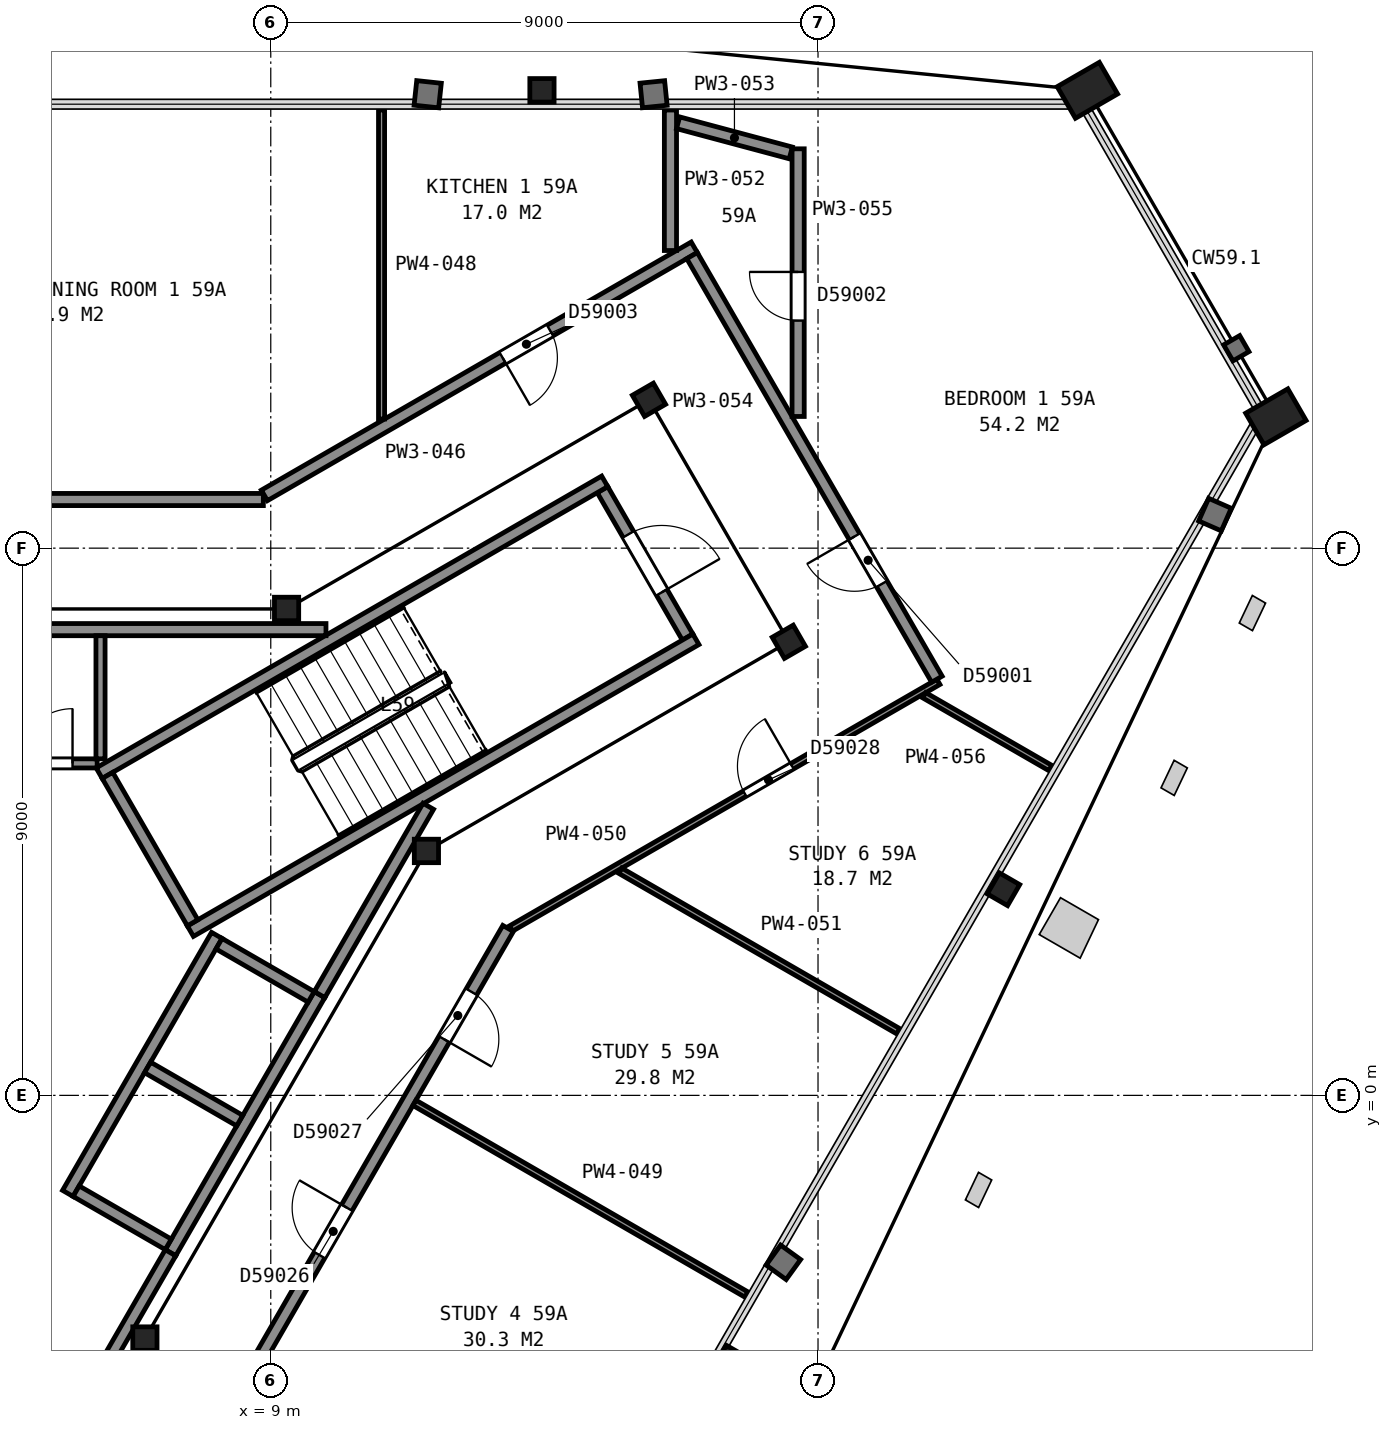
"""IFC4 building model, lengths in metres.
Left out: names, types, materials, properties, quantities, classifications, styles, units other than length and angle.
Written with IfcOpenShell. Run it as: python <this file> out.ifc"""

import sys

from ifc_helpers import new_model, si_unit, direction, frame, frame_2d, origin, origin_2d, place, context, subcontext, project, spatial, rectangle, hollow_rectangle, i_section, extrude, element, fill, save


model = new_model("IFC4")
c1 = context("Model", 3, precision=1e-05, world=origin(), true_north=direction((0.0, 1.0)))
c2 = subcontext(c1, "Body", "Model", "MODEL_VIEW")
j1 = project(units=[si_unit("LENGTHUNIT", "METRE"), si_unit("PLANEANGLEUNIT", "RADIAN")], contexts=[c1])
p1 = place(None, origin())
s1 = spatial("IfcSite", under=j1, at=p1, CompositionType="ELEMENT")
p2 = place(p1, origin())
s2 = spatial("IfcBuilding", under=s1, at=p2, CompositionType="ELEMENT")
p3 = place(p2, frame((0.0, 0.0, 236.0)))
s3 = spatial("IfcBuildingStorey", under=s2, at=p3, CompositionType="ELEMENT", Elevation=236.0)
p4 = place(p3, frame((22.43, 16.53, 0.065), z_axis=(0.0, 0.0, 1.0), x_axis=(0.5, -0.866025403784, 0.0)))
e1 = element("IfcColumn", 1, at=p4, inside=s3, PredefinedType="COLUMN", context=c2, shape_type="SweptSolid", body=[
    extrude(hollow_rectangle(XDim=0.6, YDim=0.8, WallThickness=0.05, at=origin_2d()), origin(), (0.0, 0.0, 1.0), 3.635),
])
for number, where, z_axis, x_axis in (
    (2, (13.46, 16.53, 0.035), (0.0, 0.0, 1.0), (1.0, 0.0, 0.0)),
    (3, (16.56, -4.38, 0.035), (0.0, 0.0, 1.0), (-0.5, -0.866, 0.0)),
):
    element("IfcColumn", number, at=place(p3, frame(where, z_axis=z_axis, x_axis=x_axis)), inside=s3, PredefinedType="COLUMN", context=c2, shape_type="SweptSolid", body=[
        extrude(i_section(OverallWidth=0.399, OverallDepth=0.386, WebThickness=0.021, FlangeThickness=0.033, FilletRadius=0.015, at=origin_2d()), origin(), (0.0, 0.0, 1.0), 3.665),
    ])
p5 = place(p3, frame((21.05, 3.39, 0.04), z_axis=(0.0, 0.0, 1.0), x_axis=(-0.5, -0.866025403784, 0.0)))
e4 = element("IfcColumn", 4, at=p5, inside=s3, PredefinedType="COLUMN", context=c2, shape_type="SweptSolid", body=[
    extrude(i_section(OverallWidth=0.399, OverallDepth=0.386, WebThickness=0.021, FlangeThickness=0.033, FilletRadius=0.015, at=origin_2d()), origin(), (0.0, 0.0, 1.0), 3.66),
])
p6 = place(p3, frame((25.53, 11.16, 0.065), z_axis=(0.0, 0.0, 1.0), x_axis=(0.5, -0.866025403784, 0.0)))
e5 = element("IfcColumn", 5, at=p6, inside=s3, PredefinedType="COLUMN", context=c2, shape_type="SweptSolid", body=[
    extrude(hollow_rectangle(XDim=0.6, YDim=0.8, WallThickness=0.05, at=origin_2d()), origin(), (0.0, 0.0, 1.0), 3.635),
])
p7 = place(p3, frame((11.56, 4.02, 0.0), z_axis=(0.0, 0.0, 1.0), x_axis=(1.0, 0.0, 0.0)))
e6 = element("IfcColumn", 6, at=p7, inside=s3, PredefinedType="COLUMN", context=c2, shape_type="SweptSolid", body=[
    extrude(i_section(OverallWidth=0.399, OverallDepth=0.386, WebThickness=0.021, FlangeThickness=0.033, FilletRadius=0.015, at=origin_2d()), origin(), (0.0, 0.0, 1.0), 3.7),
])
for number, where, z_axis, x_axis in (
    (7, (17.52, 7.46, 0.0), (0.0, 0.0, 1.0), (0.5, -0.866, 0.0)),
    (8, (15.22, 11.44, 0.0), (0.0, 0.0, 1.0), (0.5, -0.866, 0.0)),
):
    element("IfcColumn", number, at=place(p3, frame(where, z_axis=z_axis, x_axis=x_axis)), inside=s3, PredefinedType="COLUMN", context=c2, shape_type="SweptSolid", body=[
        extrude(i_section(OverallWidth=0.401, OverallDepth=0.399, WebThickness=0.025, FlangeThickness=0.04, FilletRadius=0.015, at=origin_2d()), origin(), (0.0, 0.0, 1.0), 3.7),
    ])
for number, where, z_axis, x_axis in (
    (9, (9.26, 8.0, 0.0), (0.0, 0.0, 1.0), (1.0, 0.0, 0.0)),
    (10, (6.93, -4.0, 0.0), (0.0, 0.0, 1.0), (1.0, 0.0, 0.0)),
):
    element("IfcColumn", number, at=place(p3, frame(where, z_axis=z_axis, x_axis=x_axis)), inside=s3, PredefinedType="COLUMN", context=c2, shape_type="SweptSolid", body=[
        extrude(i_section(OverallWidth=0.399, OverallDepth=0.386, WebThickness=0.021, FlangeThickness=0.033, FilletRadius=0.015, at=origin_2d()), origin(), (0.0, 0.0, 1.0), 3.7),
    ])
p8 = place(p3, frame((15.855, 7.538, 0.0), z_axis=(0.0, 0.0, 1.0), x_axis=(-0.500049511043, 0.865996816683, 0.0)))
e11 = element("IfcWall", 11, at=p8, inside=s3, PredefinedType="PARTITIONING", context=c2, shape_type="SweptSolid", body=[
    extrude(rectangle(XDim=2.8, YDim=0.2, at=frame_2d((1.4, 0.0))), origin(), (0.0, 0.0, 1.0), 3.45),
])
p9 = place(p8, frame((0.85, 0.0, 0.0)))
e12 = element("IfcOpeningElement", 12, at=p9, cuts=e11, PredefinedType="OPENING", context=c2, shape_type="SweptSolid", body=[
    extrude(rectangle(XDim=1.1, YDim=2.1, at=frame_2d((0.55, 1.05))), frame((0.0, 0.11, 0.0), z_axis=(0.0, -1.0, 0.0), x_axis=(1.0, 0.0, 0.0)), (0.0, 0.0, 1.0), 0.22),
])
for number, where, z_axis, x_axis in (
    (13, (6.178, 5.299, 0.0), (0.0, 0.0, 1.0), (0.866, 0.5, 0.0)),
    (14, (7.678, 2.701, 0.0), (0.0, 0.0, 1.0), (0.866, 0.5, 0.0)),
):
    element("IfcWall", number, at=place(p3, frame(where, z_axis=z_axis, x_axis=x_axis)), inside=s3, PredefinedType="PARTITIONING", context=c2, shape_type="SweptSolid", body=[
        extrude(rectangle(XDim=9.6, YDim=0.2, at=frame_2d((4.8, 0.0))), origin(), (0.0, 0.0, 1.0), 3.45),
    ])
p10 = place(p3, frame((7.715, 2.838, 0.0), z_axis=(0.0, 0.0, 1.0), x_axis=(-0.500049511043, 0.865996816683, 0.0)))
e15 = element("IfcWall", 15, at=p10, inside=s3, PredefinedType="PARTITIONING", context=c2, shape_type="SweptSolid", body=[
    extrude(rectangle(XDim=2.8, YDim=0.2, at=frame_2d((1.4, 0.0))), origin(), (0.0, 0.0, 1.0), 3.45),
])
p11 = place(p3, frame((7.351, -2.587, 0.0), z_axis=(0.0, 0.0, 1.0), x_axis=(0.500002801628, 0.866023786258, 0.0)))
e16 = element("IfcWall", 16, at=p11, inside=s3, PredefinedType="PARTITIONING", context=c2, shape_type="SweptSolid", body=[
    extrude(rectangle(XDim=4.9, YDim=0.2, at=frame_2d((2.45, 0.0))), origin(), (0.0, 0.0, 1.0), 3.7),
])
p12 = place(p3, frame((5.663, -1.612, 0.0), z_axis=(0.0, 0.0, 1.0), x_axis=(0.49998122708, 0.866036242063, 0.0)))
e17 = element("IfcWall", 17, at=p12, inside=s3, PredefinedType="PARTITIONING", context=c2, shape_type="SweptSolid", body=[
    extrude(rectangle(XDim=4.9, YDim=0.2, at=frame_2d((2.45, 0.0))), origin(), (0.0, 0.0, 1.0), 3.7),
])
p13 = place(p3, frame((9.665, 1.62, 0.0), z_axis=(0.0, 0.0, 1.0), x_axis=(-0.866002029911, 0.500040482552, 0.0)))
e18 = element("IfcWall", 18, at=p13, inside=s3, PredefinedType="PARTITIONING", context=c2, shape_type="SweptSolid", body=[
    extrude(rectangle(XDim=1.75, YDim=0.2, at=frame_2d((0.875, 0.0))), origin(), (0.0, 0.0, 1.0), 3.7),
])
for number, where, z_axis, x_axis in (
    (19, (8.49, -0.416, 0.0), (0.0, 0.0, 1.0), (-0.866, 0.5, 0.0)),
    (20, (7.315, -2.451, 0.0), (0.0, 0.0, 1.0), (-0.866, 0.5, 0.0)),
):
    element("IfcWall", number, at=place(p3, frame(where, z_axis=z_axis, x_axis=x_axis)), inside=s3, PredefinedType="PARTITIONING", context=c2, shape_type="SweptSolid", body=[
        extrude(rectangle(XDim=1.75, YDim=0.2, at=frame_2d((0.875, 0.0))), origin(), (0.0, 0.0, 1.0), 3.7),
    ])
p14 = place(p3, frame((5.905, -4.893, 0.0), z_axis=(0.0, 0.0, 1.0), x_axis=(-0.866002029911, 0.500040482552, 0.0)))
e21 = element("IfcWall", 21, at=p14, inside=s3, PredefinedType="PARTITIONING", context=c2, shape_type="SweptSolid", body=[
    extrude(rectangle(XDim=1.75, YDim=0.2, at=frame_2d((0.875, 0.0))), origin(), (0.0, 0.0, 1.0), 3.7),
])
p15 = place(p3, frame((-3.933, 7.66, 0.0), z_axis=(0.0, 0.0, 1.0), x_axis=(1.0, 0.0, 0.0)))
e22 = element("IfcWall", 22, at=p15, inside=s3, PredefinedType="PARTITIONING", context=c2, shape_type="SweptSolid", body=[
    extrude(rectangle(XDim=13.841, YDim=0.2, at=frame_2d((6.92, 0.0))), origin(), (0.0, 0.0, 1.0), 3.45),
])
p16 = place(p3, frame((0.925, 5.46, 0.0), z_axis=(0.0, 0.0, 1.0), x_axis=(1.0, 0.0, 0.0)))
e23 = element("IfcWall", 23, at=p16, inside=s3, PredefinedType="PARTITIONING", context=c2, shape_type="SweptSolid", body=[
    extrude(rectangle(XDim=5.22, YDim=0.15, at=frame_2d((2.61, 0.0))), origin(), (0.0, 0.0, 1.0), 3.45),
])
p17 = place(p16, frame((3.915, 0.0, 0.0)))
e24 = element("IfcOpeningElement", 24, at=p17, cuts=e23, PredefinedType="OPENING", context=c2, shape_type="SweptSolid", body=[
    extrude(rectangle(XDim=0.9, YDim=2.1, at=frame_2d((0.45, 1.05))), frame((0.0, 0.085, 0.0), z_axis=(0.0, -1.0, 0.0), x_axis=(1.0, 0.0, 0.0)), (0.0, 0.0, 1.0), 0.17),
])
p18 = place(p3, frame((6.042, -4.855, 0.0), z_axis=(0.0, 0.0, 1.0), x_axis=(0.500252727967, 0.865879442048, 0.0)))
e25 = element("IfcWall", 25, at=p18, inside=s3, PredefinedType="PARTITIONING", context=c2, shape_type="SweptSolid", body=[
    extrude(rectangle(XDim=2.617, YDim=0.2, at=frame_2d((1.309, 0.0))), origin(), (0.0, 0.0, 1.0), 3.45),
])
p19 = place(p3, frame((6.2, 5.535, 0.0), z_axis=(0.0, 0.0, 1.0), x_axis=(0.0, 1.0, 0.0)))
e26 = element("IfcWall", 26, at=p19, inside=s3, PredefinedType="PARTITIONING", context=c2, shape_type="SweptSolid", body=[
    extrude(rectangle(XDim=2.025, YDim=0.15, at=frame_2d((1.013, 0.0))), origin(), (0.0, 0.0, 1.0), 3.45),
])
p20 = place(p3, frame((9.803, 1.658, 0.0), z_axis=(0.0, 0.0, 1.0), x_axis=(0.499943114462, 0.866058244174, 0.0)))
e27 = element("IfcWall", 27, at=p20, inside=s3, PredefinedType="PARTITIONING", context=c2, shape_type="SweptSolid", body=[
    extrude(rectangle(XDim=3.576, YDim=0.2, at=frame_2d((1.788, 0.0))), origin(), (0.0, 0.0, 1.0), 3.45),
])
p21 = place(p3, frame((-8.878, 9.8, 0.0), z_axis=(0.0, 0.0, 1.0), x_axis=(1.0, 0.0, 0.0)))
e28 = element("IfcWall", 28, at=p21, inside=s3, PredefinedType="PARTITIONING", context=c2, shape_type="SweptSolid", body=[
    extrude(rectangle(XDim=17.756, YDim=0.2, at=frame_2d((8.878, 0.0))), origin(), (0.0, 0.0, 1.0), 2.713),
])
p22 = place(p21, frame((12.792, 0.0, 0.0)))
e29 = element("IfcOpeningElement", 29, at=p22, cuts=e28, PredefinedType="OPENING", context=c2, shape_type="SweptSolid", body=[
    extrude(rectangle(XDim=1.2, YDim=2.1, at=frame_2d((0.6, 1.05))), frame((0.0, 0.11, 0.0), z_axis=(0.0, -1.0, 0.0), x_axis=(1.0, 0.0, 0.0)), (0.0, 0.0, 1.0), 0.22),
])
p23 = place(p21, frame((5.013, 0.0, 0.0)))
e30 = element("IfcOpeningElement", 30, at=p23, cuts=e28, PredefinedType="OPENING", context=c2, shape_type="SweptSolid", body=[
    extrude(rectangle(XDim=0.9, YDim=2.1, at=frame_2d((0.45, 1.05))), frame((0.0, 0.11, 0.0), z_axis=(0.0, -1.0, 0.0), x_axis=(1.0, 0.0, 0.0)), (0.0, 0.0, 1.0), 0.22),
])
p24 = place(p21, frame((1.834, 0.0, 0.0)))
e31 = element("IfcOpeningElement", 31, at=p24, cuts=e28, PredefinedType="OPENING", context=c2, shape_type="SweptSolid", body=[
    extrude(rectangle(XDim=0.9, YDim=2.1, at=frame_2d((0.45, 1.05))), frame((0.0, 0.11, 0.0), z_axis=(0.0, -1.0, 0.0), x_axis=(1.0, 0.0, 0.0)), (0.0, 0.0, 1.0), 0.22),
])
p25 = place(p3, frame((12.903, 2.745, 0.0), z_axis=(0.0, 0.0, 1.0), x_axis=(-0.499997769292, -0.86602669168, 0.0)))
e32 = element("IfcWall", 32, at=p25, inside=s3, PredefinedType="PARTITIONING", context=c2, shape_type="SweptSolid", body=[
    extrude(rectangle(XDim=17.706, YDim=0.2, at=frame_2d((8.853, 0.0))), origin(), (0.0, 0.0, 1.0), 2.713),
])
p26 = place(p25, frame((14.637, 0.0, 0.0)))
e33 = element("IfcOpeningElement", 33, at=p26, cuts=e32, PredefinedType="OPENING", context=c2, shape_type="SweptSolid", body=[
    extrude(rectangle(XDim=0.9, YDim=2.1, at=frame_2d((0.45, 1.05))), frame((0.0, 0.11, 0.0), z_axis=(0.0, -1.0, 0.0), x_axis=(1.0, 0.0, 0.0)), (0.0, 0.0, 1.0), 0.22),
])
p27 = place(p25, frame((11.858, 0.0, 0.0)))
e34 = element("IfcOpeningElement", 34, at=p27, cuts=e32, PredefinedType="OPENING", context=c2, shape_type="SweptSolid", body=[
    extrude(rectangle(XDim=0.9, YDim=2.1, at=frame_2d((0.45, 1.05))), frame((0.0, 0.11, 0.0), z_axis=(0.0, -1.0, 0.0), x_axis=(1.0, 0.0, 0.0)), (0.0, 0.0, 1.0), 0.22),
])
p28 = place(p25, frame((5.303, 0.0, 0.0)))
e35 = element("IfcOpeningElement", 35, at=p28, cuts=e32, PredefinedType="OPENING", context=c2, shape_type="SweptSolid", body=[
    extrude(rectangle(XDim=0.9, YDim=2.1, at=frame_2d((0.45, 1.05))), frame((0.0, 0.11, 0.0), z_axis=(0.0, -1.0, 0.0), x_axis=(1.0, 0.0, 0.0)), (0.0, 0.0, 1.0), 0.22),
])
p29 = place(p25, frame((1.204, 0.0, 0.0)))
e36 = element("IfcOpeningElement", 36, at=p29, cuts=e32, PredefinedType="OPENING", context=c2, shape_type="SweptSolid", body=[
    extrude(rectangle(XDim=0.9, YDim=2.1, at=frame_2d((0.45, 1.05))), frame((0.0, 0.11, 0.0), z_axis=(0.0, -1.0, 0.0), x_axis=(1.0, 0.0, 0.0)), (0.0, 0.0, 1.0), 0.22),
])
p30 = place(p3, frame((8.895, 9.867, 0.0), z_axis=(0.0, 0.0, 1.0), x_axis=(0.866081499088, 0.499902827495, 0.0)))
e37 = element("IfcWall", 37, at=p30, inside=s3, PredefinedType="PARTITIONING", context=c2, shape_type="SweptSolid", body=[
    extrude(rectangle(XDim=8.163, YDim=0.2, at=frame_2d((4.081, 0.0))), origin(), (0.0, 0.0, 1.0), 2.713),
])
p31 = place(p30, frame((4.525, 0.0, 0.0)))
e38 = element("IfcOpeningElement", 38, at=p31, cuts=e37, PredefinedType="OPENING", context=c2, shape_type="SweptSolid", body=[
    extrude(rectangle(XDim=0.9, YDim=2.1, at=frame_2d((0.45, 1.05))), frame((0.0, 0.11, 0.0), z_axis=(0.0, -1.0, 0.0), x_axis=(1.0, 0.0, 0.0)), (0.0, 0.0, 1.0), 0.22),
])
p32 = place(p3, frame((10.822, 11.124, 0.0), z_axis=(0.0, 0.0, 1.0), x_axis=(0.0, 1.0, 0.0)))
e39 = element("IfcWall", 39, at=p32, inside=s3, PredefinedType="PARTITIONING", context=c2, shape_type="SweptSolid", body=[
    extrude(rectangle(XDim=5.082, YDim=0.1, at=frame_2d((2.541, 0.0))), origin(), (0.0, 0.0, 1.0), 2.713),
])
p33 = place(p3, frame((11.363, -0.123, 0.0), z_axis=(0.0, 0.0, 1.0), x_axis=(0.866027573341, -0.4999962422, 0.0)))
e40 = element("IfcWall", 40, at=p33, inside=s3, PredefinedType="PARTITIONING", context=c2, shape_type="SweptSolid", body=[
    extrude(rectangle(XDim=6.304, YDim=0.1, at=frame_2d((3.152, 0.0))), origin(), (0.0, 0.0, 1.0), 2.713),
])
p34 = place(p3, frame((19.98, 6.801, 0.0), z_axis=(0.0, 0.0, 1.0), x_axis=(-0.866087400697, -0.49989260282, 0.0)))
e41 = element("IfcWall", 41, at=p34, inside=s3, PredefinedType="PARTITIONING", context=c2, shape_type="SweptSolid", body=[
    extrude(rectangle(XDim=8.115, YDim=0.1, at=frame_2d((4.058, 0.0))), origin(), (0.0, 0.0, 1.0), 2.713),
])
p35 = place(p34, frame((2.777, 0.0, 0.0)))
e42 = element("IfcOpeningElement", 42, at=p35, cuts=e41, PredefinedType="OPENING", context=c2, shape_type="SweptSolid", body=[
    extrude(rectangle(XDim=0.9, YDim=2.1, at=frame_2d((0.45, 1.05))), frame((0.0, 0.06, 0.0), z_axis=(0.0, -1.0, 0.0), x_axis=(1.0, 0.0, 0.0)), (0.0, 0.0, 1.0), 0.12),
])
p36 = place(p3, frame((14.748, 3.695, 0.0), z_axis=(0.0, 0.0, 1.0), x_axis=(0.86599232748, -0.500057285464, 0.0)))
e43 = element("IfcWall", 43, at=p36, inside=s3, PredefinedType="PARTITIONING", context=c2, shape_type="SweptSolid", body=[
    extrude(rectangle(XDim=5.281, YDim=0.1, at=frame_2d((2.64, 0.0))), origin(), (0.0, 0.0, 1.0), 2.713),
])
p37 = place(p3, frame((15.573, 13.895, 0.0), z_axis=(0.0, 0.0, 1.0), x_axis=(0.0, 1.0, 0.0)))
e44 = element("IfcWall", 44, at=p37, inside=s3, PredefinedType="PARTITIONING", context=c2, shape_type="SweptSolid", body=[
    extrude(rectangle(XDim=2.311, YDim=0.2, at=frame_2d((1.155, 0.0))), origin(), (0.0, 0.0, 1.0), 2.713),
])
p38 = place(p3, frame((15.699, 15.996, 0.0), z_axis=(0.0, 0.0, 1.0), x_axis=(0.96599800534, -0.258549518816, 0.0)))
e45 = element("IfcWall", 45, at=p38, inside=s3, PredefinedType="PARTITIONING", context=c2, shape_type="SweptSolid", body=[
    extrude(rectangle(XDim=1.919, YDim=0.2, at=frame_2d((0.959, 0.0))), origin(), (0.0, 0.0, 1.0), 2.713),
])
p39 = place(p3, frame((15.928, 13.812, 0.0), z_axis=(0.0, 0.0, 1.0), x_axis=(0.500422653123, -0.865781247337, 0.0)))
e46 = element("IfcWall", 46, at=p39, inside=s3, PredefinedType="PARTITIONING", context=c2, shape_type="SweptSolid", body=[
    extrude(rectangle(XDim=8.047, YDim=0.2, at=frame_2d((4.024, 0.0))), origin(), (0.0, 0.0, 1.0), 2.713),
])
p40 = place(p39, frame((5.337, 0.0, 0.0)))
e47 = element("IfcOpeningElement", 47, at=p40, cuts=e46, PredefinedType="OPENING", context=c2, shape_type="SweptSolid", body=[
    extrude(rectangle(XDim=0.9, YDim=2.1, at=frame_2d((0.45, 1.05))), frame((0.0, 0.11, 0.0), z_axis=(0.0, -1.0, 0.0), x_axis=(1.0, 0.0, 0.0)), (0.0, 0.0, 1.0), 0.22),
])
p41 = place(p3, frame((17.673, 11.166, 0.0), z_axis=(0.0, 0.0, 1.0), x_axis=(0.0, 1.0, 0.0)))
e48 = element("IfcWall", 48, at=p41, inside=s3, PredefinedType="PARTITIONING", context=c2, shape_type="SweptSolid", body=[
    extrude(rectangle(XDim=4.402, YDim=0.2, at=frame_2d((2.201, 0.0))), origin(), (0.0, 0.0, 1.0), 2.713),
])
p42 = place(p41, frame((1.577, 0.0, 0.0)))
e49 = element("IfcOpeningElement", 49, at=p42, cuts=e48, PredefinedType="OPENING", context=c2, shape_type="SweptSolid", body=[
    extrude(rectangle(XDim=0.8, YDim=2.1, at=frame_2d((0.4, 1.05))), frame((0.0, 0.11, 0.0), z_axis=(0.0, -1.0, 0.0), x_axis=(1.0, 0.0, 0.0)), (0.0, 0.0, 1.0), 0.22),
])
p43 = place(p3, frame((19.747, 6.581, 0.0), z_axis=(0.0, 0.0, 1.0), x_axis=(0.866139751882, -0.499801890962, 0.0)))
e50 = element("IfcWall", 50, at=p43, inside=s3, PredefinedType="PARTITIONING", context=c2, shape_type="SweptSolid", body=[
    extrude(rectangle(XDim=2.395, YDim=0.1, at=frame_2d((1.197, 0.0))), origin(), (0.0, 0.0, 1.0), 2.713),
])
p44 = place(p9, origin())
e51 = element("IfcDoor", 51, at=p44, inside=s3, OperationType="SINGLE_SWING_LEFT", PredefinedType="DOOR", context=c2, shape_type="SweptSolid", body=[
    extrude(rectangle(XDim=1.1, YDim=2.1, at=frame_2d((0.55, 1.05))), frame((0.0, 0.025, 0.0), z_axis=(0.0, -1.0, 0.0), x_axis=(1.0, 0.0, 0.0)), (0.0, 0.0, 1.0), 0.05),
])
fill(e12, e51)
p45 = place(p17, origin())
e52 = element("IfcDoor", 52, at=p45, inside=s3, OperationType="SINGLE_SWING_RIGHT", PredefinedType="DOOR", context=c2, shape_type="SweptSolid", body=[
    extrude(rectangle(XDim=0.9, YDim=2.1, at=frame_2d((0.45, 1.05))), frame((0.0, 0.025, 0.0), z_axis=(0.0, -1.0, 0.0), x_axis=(1.0, 0.0, 0.0)), (0.0, 0.0, 1.0), 0.05),
])
fill(e24, e52)
p46 = place(p28, origin())
e53 = element("IfcDoor", 53, at=p46, inside=s3, OperationType="SINGLE_SWING_LEFT", PredefinedType="DOOR", context=c2, shape_type="SweptSolid", body=[
    extrude(rectangle(XDim=0.9, YDim=2.1, at=frame_2d((0.45, 1.05))), frame((0.0, 0.025, 0.0), z_axis=(0.0, -1.0, 0.0), x_axis=(1.0, 0.0, 0.0)), (0.0, 0.0, 1.0), 0.05),
])
fill(e35, e53)
p47 = place(p29, origin())
e54 = element("IfcDoor", 54, at=p47, inside=s3, OperationType="SINGLE_SWING_RIGHT", PredefinedType="DOOR", context=c2, shape_type="SweptSolid", body=[
    extrude(rectangle(XDim=0.9, YDim=2.1, at=frame_2d((0.45, 1.05))), frame((0.0, 0.025, 0.0), z_axis=(0.0, -1.0, 0.0), x_axis=(1.0, 0.0, 0.0)), (0.0, 0.0, 1.0), 0.05),
])
fill(e36, e54)
p48 = place(p31, origin())
e55 = element("IfcDoor", 55, at=p48, inside=s3, OperationType="SINGLE_SWING_LEFT", PredefinedType="DOOR", context=c2, shape_type="SweptSolid", body=[
    extrude(rectangle(XDim=0.9, YDim=2.1, at=frame_2d((0.45, 1.05))), frame((0.0, 0.025, 0.0), z_axis=(0.0, -1.0, 0.0), x_axis=(1.0, 0.0, 0.0)), (0.0, 0.0, 1.0), 0.05),
])
fill(e38, e55)
p49 = place(p35, origin())
e56 = element("IfcDoor", 56, at=p49, inside=s3, OperationType="SINGLE_SWING_LEFT", PredefinedType="DOOR", context=c2, shape_type="SweptSolid", body=[
    extrude(rectangle(XDim=0.9, YDim=2.1, at=frame_2d((0.45, 1.05))), frame((0.0, 0.025, 0.0), z_axis=(0.0, -1.0, 0.0), x_axis=(1.0, 0.0, 0.0)), (0.0, 0.0, 1.0), 0.05),
])
fill(e42, e56)
p50 = place(p40, origin())
e57 = element("IfcDoor", 57, at=p50, inside=s3, OperationType="SINGLE_SWING_LEFT", PredefinedType="DOOR", context=c2, shape_type="SweptSolid", body=[
    extrude(rectangle(XDim=0.9, YDim=2.1, at=frame_2d((0.45, 1.05))), frame((0.0, 0.025, 0.0), z_axis=(0.0, -1.0, 0.0), x_axis=(1.0, 0.0, 0.0)), (0.0, 0.0, 1.0), 0.05),
])
fill(e47, e57)
p51 = place(p42, origin())
e58 = element("IfcDoor", 58, at=p51, inside=s3, OperationType="SINGLE_SWING_RIGHT", PredefinedType="DOOR", context=c2, shape_type="SweptSolid", body=[
    extrude(rectangle(XDim=0.8, YDim=2.1, at=frame_2d((0.4, 1.05))), frame((0.0, 0.025, 0.0), z_axis=(0.0, -1.0, 0.0), x_axis=(1.0, 0.0, 0.0)), (0.0, 0.0, 1.0), 0.05),
])
fill(e49, e58)
save(model, sys.argv[1])
